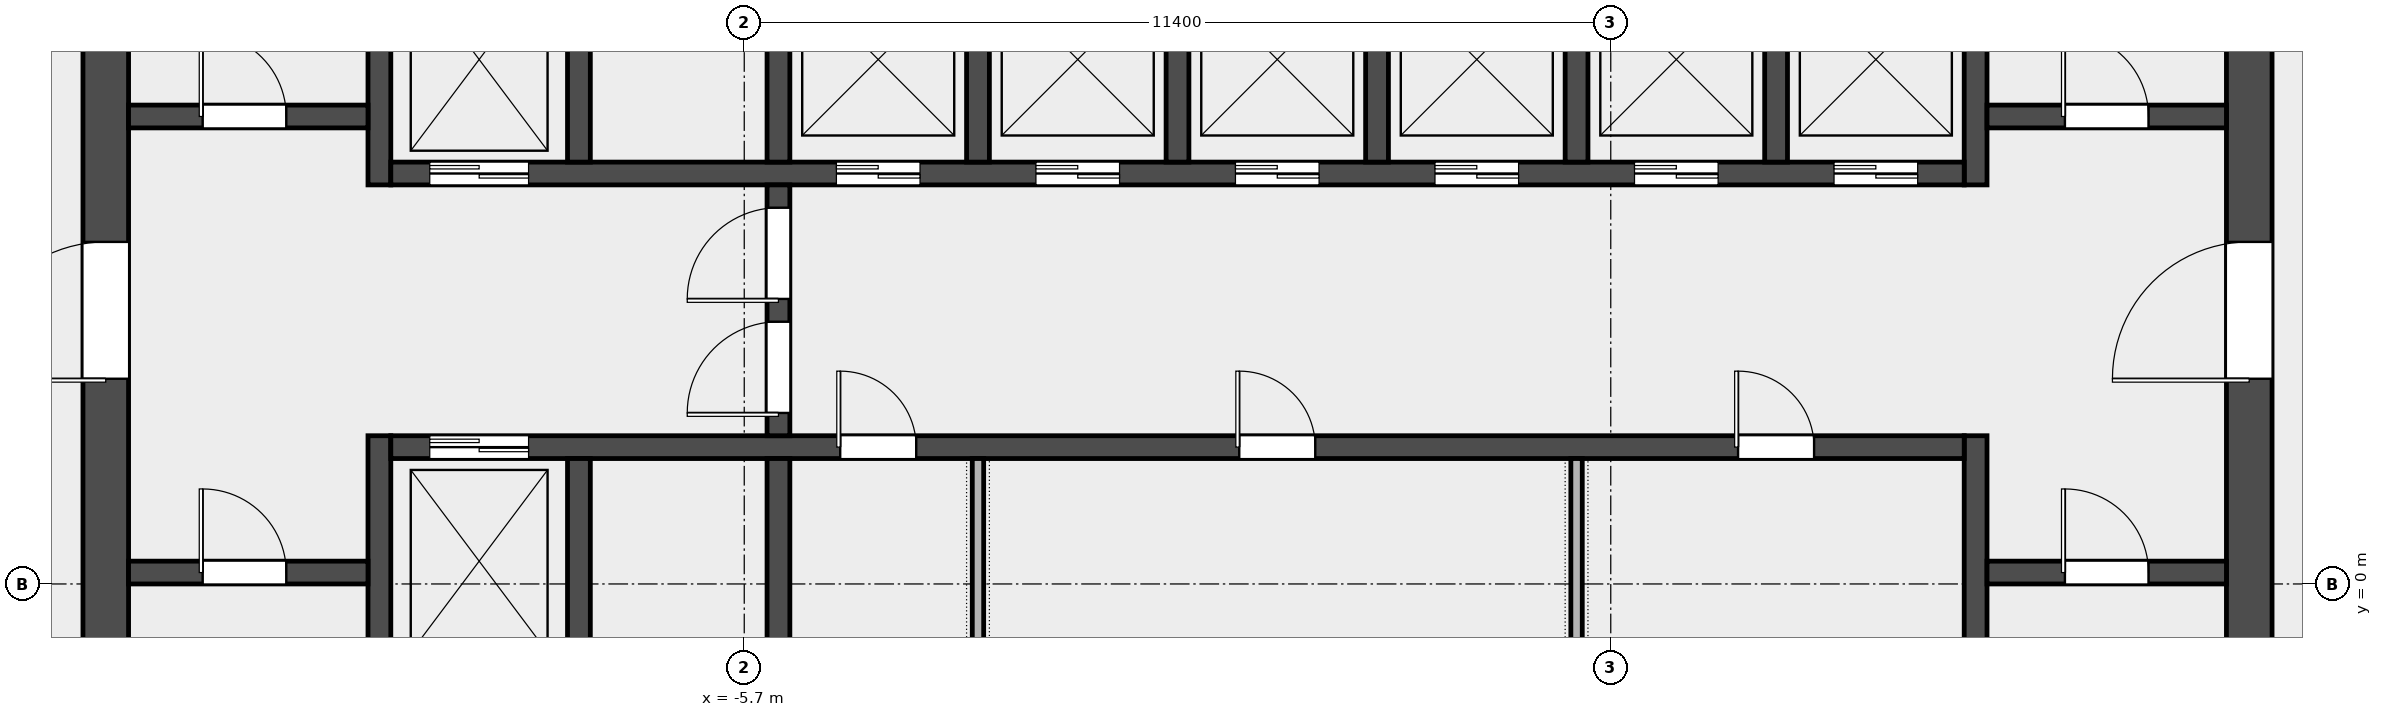
"""IFC4 building model, lengths in metres.
Left out: names, types, materials, properties, quantities, classifications, styles, units other than length and angle.
Written with IfcOpenShell. Run it as: python <this file> out.ifc"""

import sys

from ifc_helpers import new_model, si_unit, direction, frame, frame_2d, origin, place, context, subcontext, project, spatial, rectangle, extrude, element, fill, save


model = new_model("IFC4")
c1 = context("Model", 3, precision=1e-05, world=origin(), true_north=direction((0.0, 1.0)))
c2 = subcontext(c1, "Body", "Model", "MODEL_VIEW")
j1 = project(units=[si_unit("LENGTHUNIT", "METRE"), si_unit("PLANEANGLEUNIT", "RADIAN")], contexts=[c1])
p1 = place(None, origin())
s1 = spatial("IfcSite", under=j1, at=p1, CompositionType="ELEMENT")
p2 = place(p1, origin())
s2 = spatial("IfcBuilding", under=s1, at=p2, CompositionType="ELEMENT")
p3 = place(p2, frame((0.0, 0.0, 345.4)))
s3 = spatial("IfcBuildingStorey", under=s2, at=p3, CompositionType="ELEMENT", Elevation=345.4)
p4 = place(p3, frame((-14.1, -6.6, 0.0), z_axis=(0.0, 0.0, 1.0), x_axis=(0.0, 1.0, 0.0)))
e1 = element("IfcWall", 1, at=p4, inside=s3, PredefinedType="SHEAR", context=c2, shape_type="SweptSolid", body=[
    extrude(rectangle(XDim=19.5, YDim=0.6, at=frame_2d((9.75, 0.0))), origin(), (0.0, 0.0, 1.0), 3.7),
])
p5 = place(p4, frame((9.3, 0.0, 0.0)))
e2 = element("IfcOpeningElement", 2, at=p5, cuts=e1, PredefinedType="OPENING", context=c2, shape_type="SweptSolid", body=[
    extrude(rectangle(XDim=1.8, YDim=2.1, at=frame_2d((0.9, 1.05))), frame((0.0, 0.312, 0.0), z_axis=(0.0, -1.0, 0.0), x_axis=(1.0, 0.0, 0.0)), (0.0, 0.0, 1.0), 0.624),
])
p6 = place(p3, frame((14.1, -6.6, 0.0), z_axis=(0.0, 0.0, 1.0), x_axis=(0.0, 1.0, 0.0)))
e3 = element("IfcWall", 3, at=p6, inside=s3, PredefinedType="SHEAR", context=c2, shape_type="SweptSolid", body=[
    extrude(rectangle(XDim=19.5, YDim=0.6, at=frame_2d((9.75, 0.0))), origin(), (0.0, 0.0, 1.0), 3.7),
])
p7 = place(p6, frame((9.3, 0.0, 0.0)))
e4 = element("IfcOpeningElement", 4, at=p7, cuts=e3, PredefinedType="OPENING", context=c2, shape_type="SweptSolid", body=[
    extrude(rectangle(XDim=1.8, YDim=2.1, at=frame_2d((0.9, 1.05))), frame((0.0, 0.312, 0.0), z_axis=(0.0, -1.0, 0.0), x_axis=(1.0, 0.0, 0.0)), (0.0, 0.0, 1.0), 0.624),
])
p8 = place(p3, frame((-10.5, -6.6, 0.0), z_axis=(0.0, 0.0, 1.0), x_axis=(0.0, 1.0, 0.0)))
e5 = element("IfcWall", 5, at=p8, inside=s3, PredefinedType="SHEAR", context=c2, shape_type="SweptSolid", body=[
    extrude(rectangle(XDim=8.55, YDim=0.3, at=frame_2d((4.275, 0.0))), origin(), (0.0, 0.0, 1.0), 3.7),
])
p9 = place(p3, frame((-10.5, 5.25, 0.0), z_axis=(0.0, 0.0, 1.0), x_axis=(0.0, 1.0, 0.0)))
e6 = element("IfcWall", 6, at=p9, inside=s3, PredefinedType="SHEAR", context=c2, shape_type="SweptSolid", body=[
    extrude(rectangle(XDim=7.65, YDim=0.3, at=frame_2d((3.825, 0.0))), origin(), (0.0, 0.0, 1.0), 3.7),
])
p10 = place(p3, frame((10.5, -6.6, 0.0), z_axis=(0.0, 0.0, 1.0), x_axis=(0.0, 1.0, 0.0)))
e7 = element("IfcWall", 7, at=p10, inside=s3, PredefinedType="SHEAR", context=c2, shape_type="SweptSolid", body=[
    extrude(rectangle(XDim=8.55, YDim=0.3, at=frame_2d((4.275, 0.0))), origin(), (0.0, 0.0, 1.0), 3.7),
])
p11 = place(p3, frame((10.5, 5.25, 0.0), z_axis=(0.0, 0.0, 1.0), x_axis=(0.0, 1.0, 0.0)))
e8 = element("IfcWall", 8, at=p11, inside=s3, PredefinedType="SHEAR", context=c2, shape_type="SweptSolid", body=[
    extrude(rectangle(XDim=7.65, YDim=0.3, at=frame_2d((3.825, 0.0))), origin(), (0.0, 0.0, 1.0), 3.7),
])
p12 = place(p3, frame((-13.8, 0.15, 0.0), z_axis=(0.0, 0.0, 1.0), x_axis=(1.0, 0.0, 0.0)))
e9 = element("IfcWall", 9, at=p12, inside=s3, PredefinedType="SOLIDWALL", context=c2, shape_type="SweptSolid", body=[
    extrude(rectangle(XDim=3.15, YDim=0.3, at=frame_2d((1.575, 0.0))), origin(), (0.0, 0.0, 1.0), 3.7),
])
p13 = place(p12, frame((0.975, 0.0, 0.0)))
e10 = element("IfcOpeningElement", 10, at=p13, cuts=e9, PredefinedType="OPENING", context=c2, shape_type="SweptSolid", body=[
    extrude(rectangle(XDim=1.1, YDim=2.1, at=frame_2d((0.55, 1.05))), frame((0.0, 0.162, 0.0), z_axis=(0.0, -1.0, 0.0), x_axis=(1.0, 0.0, 0.0)), (0.0, 0.0, 1.0), 0.324),
])
p14 = place(p3, frame((-13.8, 6.15, 0.0), z_axis=(0.0, 0.0, 1.0), x_axis=(1.0, 0.0, 0.0)))
e11 = element("IfcWall", 11, at=p14, inside=s3, PredefinedType="SOLIDWALL", context=c2, shape_type="SweptSolid", body=[
    extrude(rectangle(XDim=3.15, YDim=0.3, at=frame_2d((1.575, 0.0))), origin(), (0.0, 0.0, 1.0), 3.7),
])
p15 = place(p14, frame((0.975, 0.0, 0.0)))
e12 = element("IfcOpeningElement", 12, at=p15, cuts=e11, PredefinedType="OPENING", context=c2, shape_type="SweptSolid", body=[
    extrude(rectangle(XDim=1.1, YDim=2.1, at=frame_2d((0.55, 1.05))), frame((0.0, 0.162, 0.0), z_axis=(0.0, -1.0, 0.0), x_axis=(1.0, 0.0, 0.0)), (0.0, 0.0, 1.0), 0.324),
])
p16 = place(p3, frame((10.65, 0.15, 0.0), z_axis=(0.0, 0.0, 1.0), x_axis=(1.0, 0.0, 0.0)))
e13 = element("IfcWall", 13, at=p16, inside=s3, PredefinedType="SOLIDWALL", context=c2, shape_type="SweptSolid", body=[
    extrude(rectangle(XDim=3.15, YDim=0.3, at=frame_2d((1.575, 0.0))), origin(), (0.0, 0.0, 1.0), 3.7),
])
p17 = place(p16, frame((1.025, 0.0, 0.0)))
e14 = element("IfcOpeningElement", 14, at=p17, cuts=e13, PredefinedType="OPENING", context=c2, shape_type="SweptSolid", body=[
    extrude(rectangle(XDim=1.1, YDim=2.1, at=frame_2d((0.55, 1.05))), frame((0.0, 0.162, 0.0), z_axis=(0.0, -1.0, 0.0), x_axis=(1.0, 0.0, 0.0)), (0.0, 0.0, 1.0), 0.324),
])
p18 = place(p3, frame((10.65, 6.15, 0.0), z_axis=(0.0, 0.0, 1.0), x_axis=(1.0, 0.0, 0.0)))
e15 = element("IfcWall", 15, at=p18, inside=s3, PredefinedType="SOLIDWALL", context=c2, shape_type="SweptSolid", body=[
    extrude(rectangle(XDim=3.15, YDim=0.3, at=frame_2d((1.575, 0.0))), origin(), (0.0, 0.0, 1.0), 3.7),
])
p19 = place(p18, frame((1.025, 0.0, 0.0)))
e16 = element("IfcOpeningElement", 16, at=p19, cuts=e15, PredefinedType="OPENING", context=c2, shape_type="SweptSolid", body=[
    extrude(rectangle(XDim=1.1, YDim=2.1, at=frame_2d((0.55, 1.05))), frame((0.0, 0.162, 0.0), z_axis=(0.0, -1.0, 0.0), x_axis=(1.0, 0.0, 0.0)), (0.0, 0.0, 1.0), 0.324),
])
p20 = place(p3, frame((-10.35, 1.8, 0.0), z_axis=(0.0, 0.0, 1.0), x_axis=(1.0, 0.0, 0.0)))
e17 = element("IfcWall", 17, at=p20, inside=s3, PredefinedType="SOLIDWALL", context=c2, shape_type="SweptSolid", body=[
    extrude(rectangle(XDim=20.7, YDim=0.3, at=frame_2d((10.35, 0.0))), origin(), (0.0, 0.0, 1.0), 3.7),
])
p21 = place(p20, frame((0.512, 0.0, 0.0)))
e18 = element("IfcOpeningElement", 18, at=p21, cuts=e17, PredefinedType="OPENING", context=c2, shape_type="SweptSolid", body=[
    extrude(rectangle(XDim=1.3, YDim=2.1, at=frame_2d((0.65, 1.05))), frame((0.0, 0.162, 0.0), z_axis=(0.0, -1.0, 0.0), x_axis=(1.0, 0.0, 0.0)), (0.0, 0.0, 1.0), 0.324),
])
p22 = place(p20, frame((5.913, 0.0, 0.0)))
e19 = element("IfcOpeningElement", 19, at=p22, cuts=e17, PredefinedType="OPENING", context=c2, shape_type="SweptSolid", body=[
    extrude(rectangle(XDim=1.0, YDim=2.1, at=frame_2d((0.5, 1.05))), frame((0.0, 0.162, 0.0), z_axis=(0.0, -1.0, 0.0), x_axis=(1.0, 0.0, 0.0)), (0.0, 0.0, 1.0), 0.324),
])
p23 = place(p20, frame((11.163, 0.0, 0.0)))
e20 = element("IfcOpeningElement", 20, at=p23, cuts=e17, PredefinedType="OPENING", context=c2, shape_type="SweptSolid", body=[
    extrude(rectangle(XDim=1.0, YDim=2.1, at=frame_2d((0.5, 1.05))), frame((0.0, 0.162, 0.0), z_axis=(0.0, -1.0, 0.0), x_axis=(1.0, 0.0, 0.0)), (0.0, 0.0, 1.0), 0.324),
])
p24 = place(p20, frame((17.725, 0.0, 0.0)))
e21 = element("IfcOpeningElement", 21, at=p24, cuts=e17, PredefinedType="OPENING", context=c2, shape_type="SweptSolid", body=[
    extrude(rectangle(XDim=1.0, YDim=2.1, at=frame_2d((0.5, 1.05))), frame((0.0, 0.162, 0.0), z_axis=(0.0, -1.0, 0.0), x_axis=(1.0, 0.0, 0.0)), (0.0, 0.0, 1.0), 0.324),
])
p25 = place(p3, frame((-10.35, 5.4, 0.0), z_axis=(0.0, 0.0, 1.0), x_axis=(1.0, 0.0, 0.0)))
e22 = element("IfcWall", 22, at=p25, inside=s3, PredefinedType="SOLIDWALL", context=c2, shape_type="SweptSolid", body=[
    extrude(rectangle(XDim=20.7, YDim=0.3, at=frame_2d((10.35, 0.0))), origin(), (0.0, 0.0, 1.0), 3.7),
])
p26 = place(p25, frame((0.512, 0.0, 0.0)))
e23 = element("IfcOpeningElement", 23, at=p26, cuts=e22, PredefinedType="OPENING", context=c2, shape_type="SweptSolid", body=[
    extrude(rectangle(XDim=1.3, YDim=2.1, at=frame_2d((0.65, 1.05))), frame((0.0, 0.162, 0.0), z_axis=(0.0, -1.0, 0.0), x_axis=(1.0, 0.0, 0.0)), (0.0, 0.0, 1.0), 0.324),
])
p27 = place(p25, frame((5.863, 0.0, 0.0)))
e24 = element("IfcOpeningElement", 24, at=p27, cuts=e22, PredefinedType="OPENING", context=c2, shape_type="SweptSolid", body=[
    extrude(rectangle(XDim=1.1, YDim=2.1, at=frame_2d((0.55, 1.05))), frame((0.0, 0.162, 0.0), z_axis=(0.0, -1.0, 0.0), x_axis=(1.0, 0.0, 0.0)), (0.0, 0.0, 1.0), 0.324),
])
p28 = place(p25, frame((8.488, 0.0, 0.0)))
e25 = element("IfcOpeningElement", 25, at=p28, cuts=e22, PredefinedType="OPENING", context=c2, shape_type="SweptSolid", body=[
    extrude(rectangle(XDim=1.1, YDim=2.1, at=frame_2d((0.55, 1.05))), frame((0.0, 0.162, 0.0), z_axis=(0.0, -1.0, 0.0), x_axis=(1.0, 0.0, 0.0)), (0.0, 0.0, 1.0), 0.324),
])
p29 = place(p25, frame((11.113, 0.0, 0.0)))
e26 = element("IfcOpeningElement", 26, at=p29, cuts=e22, PredefinedType="OPENING", context=c2, shape_type="SweptSolid", body=[
    extrude(rectangle(XDim=1.1, YDim=2.1, at=frame_2d((0.55, 1.05))), frame((0.0, 0.162, 0.0), z_axis=(0.0, -1.0, 0.0), x_axis=(1.0, 0.0, 0.0)), (0.0, 0.0, 1.0), 0.324),
])
p30 = place(p25, frame((13.738, 0.0, 0.0)))
e27 = element("IfcOpeningElement", 27, at=p30, cuts=e22, PredefinedType="OPENING", context=c2, shape_type="SweptSolid", body=[
    extrude(rectangle(XDim=1.1, YDim=2.1, at=frame_2d((0.55, 1.05))), frame((0.0, 0.162, 0.0), z_axis=(0.0, -1.0, 0.0), x_axis=(1.0, 0.0, 0.0)), (0.0, 0.0, 1.0), 0.324),
])
p31 = place(p25, frame((16.363, 0.0, 0.0)))
e28 = element("IfcOpeningElement", 28, at=p31, cuts=e22, PredefinedType="OPENING", context=c2, shape_type="SweptSolid", body=[
    extrude(rectangle(XDim=1.1, YDim=2.1, at=frame_2d((0.55, 1.05))), frame((0.0, 0.162, 0.0), z_axis=(0.0, -1.0, 0.0), x_axis=(1.0, 0.0, 0.0)), (0.0, 0.0, 1.0), 0.324),
])
p32 = place(p25, frame((18.988, 0.0, 0.0)))
e29 = element("IfcOpeningElement", 29, at=p32, cuts=e22, PredefinedType="OPENING", context=c2, shape_type="SweptSolid", body=[
    extrude(rectangle(XDim=1.1, YDim=2.1, at=frame_2d((0.55, 1.05))), frame((0.0, 0.162, 0.0), z_axis=(0.0, -1.0, 0.0), x_axis=(1.0, 0.0, 0.0)), (0.0, 0.0, 1.0), 0.324),
])
for number, where, z_axis, x_axis in (
    (30, (-7.875, -1.05, 0.0), (0.0, 0.0, 1.0), (0.0, 1.0, 0.0)),
    (31, (-5.25, -1.05, 0.0), (0.0, 0.0, 1.0), (0.0, 1.0, 0.0)),
    (32, (-7.875, 5.55, 0.0), (0.0, 0.0, 1.0), (0.0, 1.0, 0.0)),
    (33, (-5.25, 5.55, 0.0), (0.0, 0.0, 1.0), (0.0, 1.0, 0.0)),
    (34, (-2.625, 5.55, 0.0), (0.0, 0.0, 1.0), (0.0, 1.0, 0.0)),
    (35, (0.0, 5.55, 0.0), (0.0, 0.0, 1.0), (0.0, 1.0, 0.0)),
    (36, (2.625, 5.55, 0.0), (0.0, 0.0, 1.0), (0.0, 1.0, 0.0)),
    (37, (5.25, 5.55, 0.0), (0.0, 0.0, 1.0), (0.0, 1.0, 0.0)),
    (38, (7.875, 5.55, 0.0), (0.0, 0.0, 1.0), (0.0, 1.0, 0.0)),
):
    element("IfcWall", number, at=place(p3, frame(where, z_axis=z_axis, x_axis=x_axis)), inside=s3, PredefinedType="SOLIDWALL", context=c2, shape_type="SweptSolid", body=[
        extrude(rectangle(XDim=2.7, YDim=0.3, at=frame_2d((1.35, 0.0))), origin(), (0.0, 0.0, 1.0), 3.7),
    ])
p33 = place(p3, frame((-5.25, 1.95, 0.0), z_axis=(0.0, 0.0, 1.0), x_axis=(0.0, 1.0, 0.0)))
e39 = element("IfcWall", 39, at=p33, inside=s3, PredefinedType="SOLIDWALL", context=c2, shape_type="SweptSolid", body=[
    extrude(rectangle(XDim=3.3, YDim=0.3, at=frame_2d((1.65, 0.0))), origin(), (0.0, 0.0, 1.0), 3.7),
])
p34 = place(p33, frame((0.3, 0.0, 0.0)))
e40 = element("IfcOpeningElement", 40, at=p34, cuts=e39, PredefinedType="OPENING", context=c2, shape_type="SweptSolid", body=[
    extrude(rectangle(XDim=1.2, YDim=2.1, at=frame_2d((0.6, 1.05))), frame((0.0, 0.162, 0.0), z_axis=(0.0, -1.0, 0.0), x_axis=(1.0, 0.0, 0.0)), (0.0, 0.0, 1.0), 0.324),
])
p35 = place(p33, frame((1.8, 0.0, 0.0)))
e41 = element("IfcOpeningElement", 41, at=p35, cuts=e39, PredefinedType="OPENING", context=c2, shape_type="SweptSolid", body=[
    extrude(rectangle(XDim=1.2, YDim=2.1, at=frame_2d((0.6, 1.05))), frame((0.0, 0.162, 0.0), z_axis=(0.0, -1.0, 0.0), x_axis=(1.0, 0.0, 0.0)), (0.0, 0.0, 1.0), 0.324),
])
for number, where, z_axis, x_axis in (
    (42, (-2.625, -1.05, 0.0), (0.0, 0.0, 1.0), (0.0, 1.0, 0.0)),
    (43, (5.25, -1.05, 0.0), (0.0, 0.0, 1.0), (0.0, 1.0, 0.0)),
):
    element("IfcWall", number, at=place(p3, frame(where, z_axis=z_axis, x_axis=x_axis)), inside=s3, PredefinedType="PARTITIONING", context=c2, shape_type="SweptSolid", body=[
        extrude(rectangle(XDim=2.7, YDim=0.15, at=frame_2d((1.35, 0.0))), origin(), (0.0, 0.0, 1.0), 3.7),
    ])
p36 = place(p13, origin())
e44 = element("IfcDoor", 44, at=p36, inside=s3, OperationType="SINGLE_SWING_LEFT", PredefinedType="DOOR", context=c2, shape_type="SweptSolid", body=[
    extrude(rectangle(XDim=1.1, YDim=2.1, at=frame_2d((0.55, 1.05))), frame((0.0, 0.025, 0.0), z_axis=(0.0, -1.0, 0.0), x_axis=(1.0, 0.0, 0.0)), (0.0, 0.0, 1.0), 0.05),
])
fill(e10, e44)
p37 = place(p15, origin())
e45 = element("IfcDoor", 45, at=p37, inside=s3, OperationType="SINGLE_SWING_LEFT", PredefinedType="DOOR", context=c2, shape_type="SweptSolid", body=[
    extrude(rectangle(XDim=1.1, YDim=2.1, at=frame_2d((0.55, 1.05))), frame((0.0, 0.025, 0.0), z_axis=(0.0, -1.0, 0.0), x_axis=(1.0, 0.0, 0.0)), (0.0, 0.0, 1.0), 0.05),
])
fill(e12, e45)
p38 = place(p17, origin())
e46 = element("IfcDoor", 46, at=p38, inside=s3, OperationType="SINGLE_SWING_RIGHT", PredefinedType="DOOR", context=c2, shape_type="SweptSolid", body=[
    extrude(rectangle(XDim=1.1, YDim=2.1, at=frame_2d((0.55, 1.05))), frame((0.0, 0.025, 0.0), z_axis=(0.0, -1.0, 0.0), x_axis=(1.0, 0.0, 0.0)), (0.0, 0.0, 1.0), 0.05),
])
fill(e14, e46)
p39 = place(p19, origin())
e47 = element("IfcDoor", 47, at=p39, inside=s3, OperationType="SINGLE_SWING_RIGHT", PredefinedType="DOOR", context=c2, shape_type="SweptSolid", body=[
    extrude(rectangle(XDim=1.1, YDim=2.1, at=frame_2d((0.55, 1.05))), frame((0.0, 0.025, 0.0), z_axis=(0.0, -1.0, 0.0), x_axis=(1.0, 0.0, 0.0)), (0.0, 0.0, 1.0), 0.05),
])
fill(e16, e47)
p40 = place(p5, origin())
e48 = element("IfcDoor", 48, at=p40, inside=s3, OperationType="DOUBLE_DOOR_SINGLE_SWING", PredefinedType="DOOR", context=c2, shape_type="SweptSolid", body=[
    extrude(rectangle(XDim=1.8, YDim=2.1, at=frame_2d((0.9, 1.05))), frame((0.0, 0.025, 0.0), z_axis=(0.0, -1.0, 0.0), x_axis=(1.0, 0.0, 0.0)), (0.0, 0.0, 1.0), 0.05),
])
fill(e2, e48)
p41 = place(p7, origin())
e49 = element("IfcDoor", 49, at=p41, inside=s3, OperationType="DOUBLE_DOOR_SINGLE_SWING", PredefinedType="DOOR", context=c2, shape_type="SweptSolid", body=[
    extrude(rectangle(XDim=1.8, YDim=2.1, at=frame_2d((0.9, 1.05))), frame((0.0, 0.025, 0.0), z_axis=(0.0, -1.0, 0.0), x_axis=(1.0, 0.0, 0.0)), (0.0, 0.0, 1.0), 0.05),
])
fill(e4, e49)
p42 = place(p34, origin())
e50 = element("IfcDoor", 50, at=p42, inside=s3, OperationType="SINGLE_SWING_LEFT", PredefinedType="DOOR", context=c2, shape_type="SweptSolid", body=[
    extrude(rectangle(XDim=1.2, YDim=2.1, at=frame_2d((0.6, 1.05))), frame((0.0, 0.025, 0.0), z_axis=(0.0, -1.0, 0.0), x_axis=(1.0, 0.0, 0.0)), (0.0, 0.0, 1.0), 0.05),
])
fill(e40, e50)
p43 = place(p35, origin())
e51 = element("IfcDoor", 51, at=p43, inside=s3, OperationType="SINGLE_SWING_RIGHT", PredefinedType="DOOR", context=c2, shape_type="SweptSolid", body=[
    extrude(rectangle(XDim=1.2, YDim=2.1, at=frame_2d((0.6, 1.05))), frame((0.0, 0.025, 0.0), z_axis=(0.0, -1.0, 0.0), x_axis=(1.0, 0.0, 0.0)), (0.0, 0.0, 1.0), 0.05),
])
fill(e41, e51)
p44 = place(p21, origin())
e52 = element("IfcDoor", 52, at=p44, inside=s3, OperationType="DOUBLE_DOOR_SLIDING", PredefinedType="DOOR", context=c2, shape_type="SweptSolid", body=[
    extrude(rectangle(XDim=1.3, YDim=2.1, at=frame_2d((0.65, 1.05))), frame((0.0, 0.025, 0.0), z_axis=(0.0, -1.0, 0.0), x_axis=(1.0, 0.0, 0.0)), (0.0, 0.0, 1.0), 0.05),
])
fill(e18, e52)
p45 = place(p26, origin())
e53 = element("IfcDoor", 53, at=p45, inside=s3, OperationType="DOUBLE_DOOR_SLIDING", PredefinedType="DOOR", context=c2, shape_type="SweptSolid", body=[
    extrude(rectangle(XDim=1.3, YDim=2.1, at=frame_2d((0.65, 1.05))), frame((0.0, 0.025, 0.0), z_axis=(0.0, -1.0, 0.0), x_axis=(1.0, 0.0, 0.0)), (0.0, 0.0, 1.0), 0.05),
])
fill(e23, e53)
p46 = place(p27, origin())
e54 = element("IfcDoor", 54, at=p46, inside=s3, OperationType="DOUBLE_DOOR_SLIDING", PredefinedType="DOOR", context=c2, shape_type="SweptSolid", body=[
    extrude(rectangle(XDim=1.1, YDim=2.1, at=frame_2d((0.55, 1.05))), frame((0.0, 0.025, 0.0), z_axis=(0.0, -1.0, 0.0), x_axis=(1.0, 0.0, 0.0)), (0.0, 0.0, 1.0), 0.05),
])
fill(e24, e54)
p47 = place(p28, origin())
e55 = element("IfcDoor", 55, at=p47, inside=s3, OperationType="DOUBLE_DOOR_SLIDING", PredefinedType="DOOR", context=c2, shape_type="SweptSolid", body=[
    extrude(rectangle(XDim=1.1, YDim=2.1, at=frame_2d((0.55, 1.05))), frame((0.0, 0.025, 0.0), z_axis=(0.0, -1.0, 0.0), x_axis=(1.0, 0.0, 0.0)), (0.0, 0.0, 1.0), 0.05),
])
fill(e25, e55)
p48 = place(p29, origin())
e56 = element("IfcDoor", 56, at=p48, inside=s3, OperationType="DOUBLE_DOOR_SLIDING", PredefinedType="DOOR", context=c2, shape_type="SweptSolid", body=[
    extrude(rectangle(XDim=1.1, YDim=2.1, at=frame_2d((0.55, 1.05))), frame((0.0, 0.025, 0.0), z_axis=(0.0, -1.0, 0.0), x_axis=(1.0, 0.0, 0.0)), (0.0, 0.0, 1.0), 0.05),
])
fill(e26, e56)
p49 = place(p30, origin())
e57 = element("IfcDoor", 57, at=p49, inside=s3, OperationType="DOUBLE_DOOR_SLIDING", PredefinedType="DOOR", context=c2, shape_type="SweptSolid", body=[
    extrude(rectangle(XDim=1.1, YDim=2.1, at=frame_2d((0.55, 1.05))), frame((0.0, 0.025, 0.0), z_axis=(0.0, -1.0, 0.0), x_axis=(1.0, 0.0, 0.0)), (0.0, 0.0, 1.0), 0.05),
])
fill(e27, e57)
p50 = place(p31, origin())
e58 = element("IfcDoor", 58, at=p50, inside=s3, OperationType="DOUBLE_DOOR_SLIDING", PredefinedType="DOOR", context=c2, shape_type="SweptSolid", body=[
    extrude(rectangle(XDim=1.1, YDim=2.1, at=frame_2d((0.55, 1.05))), frame((0.0, 0.025, 0.0), z_axis=(0.0, -1.0, 0.0), x_axis=(1.0, 0.0, 0.0)), (0.0, 0.0, 1.0), 0.05),
])
fill(e28, e58)
p51 = place(p32, origin())
e59 = element("IfcDoor", 59, at=p51, inside=s3, OperationType="DOUBLE_DOOR_SLIDING", PredefinedType="DOOR", context=c2, shape_type="SweptSolid", body=[
    extrude(rectangle(XDim=1.1, YDim=2.1, at=frame_2d((0.55, 1.05))), frame((0.0, 0.025, 0.0), z_axis=(0.0, -1.0, 0.0), x_axis=(1.0, 0.0, 0.0)), (0.0, 0.0, 1.0), 0.05),
])
fill(e29, e59)
p52 = place(p22, origin())
e60 = element("IfcDoor", 60, at=p52, inside=s3, OperationType="SINGLE_SWING_LEFT", PredefinedType="DOOR", context=c2, shape_type="SweptSolid", body=[
    extrude(rectangle(XDim=1.0, YDim=2.1, at=frame_2d((0.5, 1.05))), frame((0.0, 0.025, 0.0), z_axis=(0.0, -1.0, 0.0), x_axis=(1.0, 0.0, 0.0)), (0.0, 0.0, 1.0), 0.05),
])
fill(e19, e60)
p53 = place(p23, origin())
e61 = element("IfcDoor", 61, at=p53, inside=s3, OperationType="SINGLE_SWING_LEFT", PredefinedType="DOOR", context=c2, shape_type="SweptSolid", body=[
    extrude(rectangle(XDim=1.0, YDim=2.1, at=frame_2d((0.5, 1.05))), frame((0.0, 0.025, 0.0), z_axis=(0.0, -1.0, 0.0), x_axis=(1.0, 0.0, 0.0)), (0.0, 0.0, 1.0), 0.05),
])
fill(e20, e61)
p54 = place(p24, origin())
e62 = element("IfcDoor", 62, at=p54, inside=s3, OperationType="SINGLE_SWING_LEFT", PredefinedType="DOOR", context=c2, shape_type="SweptSolid", body=[
    extrude(rectangle(XDim=1.0, YDim=2.1, at=frame_2d((0.5, 1.05))), frame((0.0, 0.025, 0.0), z_axis=(0.0, -1.0, 0.0), x_axis=(1.0, 0.0, 0.0)), (0.0, 0.0, 1.0), 0.05),
])
fill(e21, e62)
save(model, sys.argv[1])
